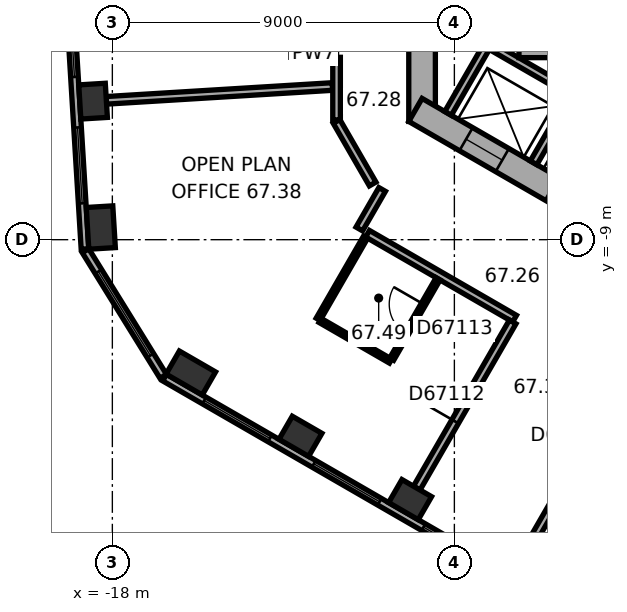
"""IFC4 building model, lengths in metres.
Left out: names, types, materials, properties, quantities, classifications, styles, units other than length and angle.
Written with IfcOpenShell. Run it as: python <this file> out.ifc"""

import sys

from ifc_helpers import new_model, si_unit, direction, frame, frame_2d, origin, origin_2d, place, context, subcontext, project, spatial, rectangle, extrude, element, fill, save


model = new_model("IFC4")
c1 = context("Model", 3, precision=1e-05, world=origin(), true_north=direction((0.0, 1.0)))
c2 = subcontext(c1, "Body", "Model", "MODEL_VIEW")
j1 = project(units=[si_unit("LENGTHUNIT", "METRE"), si_unit("PLANEANGLEUNIT", "RADIAN")], contexts=[c1])
p1 = place(None, origin())
s1 = spatial("IfcSite", under=j1, at=p1, CompositionType="ELEMENT")
p2 = place(p1, origin())
s2 = spatial("IfcBuilding", under=s1, at=p2, CompositionType="ELEMENT")
p3 = place(p2, frame((0.0, 0.0, 270.9)))
s3 = spatial("IfcBuildingStorey", under=s2, at=p3, CompositionType="ELEMENT", Elevation=270.9)
p4 = place(p3, frame((-18.508, -5.355, 0.0), z_axis=(0.0, 0.0, 1.0), x_axis=(0.061048539535, -0.998134798422, 0.0)))
e1 = element("IfcColumn", 1, at=p4, inside=s3, PredefinedType="COLUMN", context=c2, shape_type="SweptSolid", body=[
    extrude(rectangle(XDim=0.9, YDim=0.7, at=origin_2d()), origin(), (0.0, 0.0, 1.0), 3.7),
])
for number, where, z_axis, x_axis in (
    (2, (-18.304, -8.68, 0.0), (0.0, 0.0, 1.0), (0.061, -0.998, 0.0)),
    (3, (-15.936, -12.508, 0.0), (0.0, 0.0, 1.0), (0.866, -0.5, 0.0)),
):
    element("IfcColumn", number, at=place(p3, frame(where, z_axis=z_axis, x_axis=x_axis)), inside=s3, PredefinedType="COLUMN", context=c2, shape_type="SweptSolid", body=[
        extrude(rectangle(XDim=1.1, YDim=0.7, at=origin_2d()), origin(), (0.0, 0.0, 1.0), 3.7),
    ])
for number, where, z_axis, x_axis in (
    (4, (-13.05, -14.174, 0.0), (0.0, 0.0, 1.0), (0.866, -0.5, 0.0)),
    (5, (-10.165, -15.84, 0.0), (0.0, 0.0, 1.0), (0.866, -0.5, 0.0)),
):
    element("IfcColumn", number, at=place(p3, frame(where, z_axis=z_axis, x_axis=x_axis)), inside=s3, PredefinedType="COLUMN", context=c2, shape_type="SweptSolid", body=[
        extrude(rectangle(XDim=0.9, YDim=0.7, at=origin_2d()), origin(), (0.0, 0.0, 1.0), 3.7),
    ])
p5 = place(p3, frame((-9.85, 5.889, 0.0), z_axis=(0.0, 0.0, 1.0), x_axis=(0.0, -1.0, 0.0)))
e6 = element("IfcWall", 6, at=p5, inside=s3, PredefinedType="SHEAR", context=c2, shape_type="SweptSolid", body=[
    extrude(rectangle(XDim=11.778, YDim=0.7, at=frame_2d((5.889, 0.0))), origin(), (0.0, 0.0, 1.0), 3.7),
])
p6 = place(p5, frame((5.039, 0.0, 0.0)))
e7 = element("IfcOpeningElement", 7, at=p6, cuts=e6, PredefinedType="OPENING", context=c2, shape_type="SweptSolid", body=[
    extrude(rectangle(XDim=1.1, YDim=2.1, at=frame_2d((0.55, 1.05))), frame((0.0, 0.36, 0.0), z_axis=(0.0, -1.0, 0.0), x_axis=(1.0, 0.0, 0.0)), (0.0, 0.0, 1.0), 0.72),
])
p7 = place(p5, frame((7.639, 0.0, 0.0)))
e8 = element("IfcOpeningElement", 8, at=p7, cuts=e6, PredefinedType="OPENING", context=c2, shape_type="SweptSolid", body=[
    extrude(rectangle(XDim=1.1, YDim=2.1, at=frame_2d((0.55, 1.05))), frame((0.0, 0.36, 0.0), z_axis=(0.0, -1.0, 0.0), x_axis=(1.0, 0.0, 0.0)), (0.0, 0.0, 1.0), 0.72),
])
p8 = place(p3, frame((-10.025, -5.586, 0.0), z_axis=(0.0, 0.0, 1.0), x_axis=(0.866026453023, -0.499998182661, 0.0)))
e9 = element("IfcWall", 9, at=p8, inside=s3, PredefinedType="SHEAR", context=c2, shape_type="SweptSolid", body=[
    extrude(rectangle(XDim=11.778, YDim=0.7, at=frame_2d((5.889, 0.0))), origin(), (0.0, 0.0, 1.0), 3.7),
])
p9 = place(p8, frame((6.089, 0.0, 0.0)))
e10 = element("IfcOpeningElement", 10, at=p9, cuts=e9, PredefinedType="OPENING", context=c2, shape_type="SweptSolid", body=[
    extrude(rectangle(XDim=1.5, YDim=2.1, at=frame_2d((0.75, 1.05))), frame((0.0, 0.36, 0.0), z_axis=(0.0, -1.0, 0.0), x_axis=(1.0, 0.0, 0.0)), (0.0, 0.0, 1.0), 0.72),
])
p10 = place(p8, frame((1.539, 0.0, 0.0)))
e11 = element("IfcOpeningElement", 11, at=p10, cuts=e9, PredefinedType="OPENING", context=c2, shape_type="SweptSolid", body=[
    extrude(rectangle(XDim=1.1, YDim=2.1, at=frame_2d((0.55, 1.05))), frame((0.0, 0.36, 0.0), z_axis=(0.0, -1.0, 0.0), x_axis=(1.0, 0.0, 0.0)), (0.0, 0.0, 1.0), 0.72),
])
p11 = place(p8, frame((4.139, 0.0, 0.0)))
e12 = element("IfcOpeningElement", 12, at=p11, cuts=e9, PredefinedType="OPENING", context=c2, shape_type="SweptSolid", body=[
    extrude(rectangle(XDim=1.1, YDim=2.1, at=frame_2d((0.55, 1.05))), frame((0.0, 0.36, 0.0), z_axis=(0.0, -1.0, 0.0), x_axis=(1.0, 0.0, 0.0)), (0.0, 0.0, 1.0), 0.72),
])
p12 = place(p3, frame((-19.803, 8.454, 0.0), z_axis=(0.0, 0.0, 1.0), x_axis=(0.061036717565, -0.998135521414, 0.0)))
e13 = element("IfcWall", 13, at=p12, inside=s3, PredefinedType="STANDARD", context=c2, shape_type="SweptSolid", body=[
    extrude(rectangle(XDim=17.731, YDim=0.2, at=frame_2d((8.866, 0.0))), origin(), (0.0, 0.0, 1.0), 3.7),
])
p13 = place(p12, frame((1.202, 0.0, 0.9)))
e14 = element("IfcOpeningElement", 14, at=p13, cuts=e13, PredefinedType="OPENING", context=c2, shape_type="SweptSolid", body=[
    extrude(rectangle(XDim=2.0, YDim=2.0, at=frame_2d((1.0, 1.0))), frame((0.0, 0.11, 0.0), z_axis=(0.0, -1.0, 0.0), x_axis=(1.0, 0.0, 0.0)), (0.0, 0.0, 1.0), 0.22),
])
p14 = place(p12, frame((4.533, 0.0, 0.9)))
e15 = element("IfcOpeningElement", 15, at=p14, cuts=e13, PredefinedType="OPENING", context=c2, shape_type="SweptSolid", body=[
    extrude(rectangle(XDim=2.0, YDim=2.0, at=frame_2d((1.0, 1.0))), frame((0.0, 0.11, 0.0), z_axis=(0.0, -1.0, 0.0), x_axis=(1.0, 0.0, 0.0)), (0.0, 0.0, 1.0), 0.22),
])
p15 = place(p12, frame((7.865, 0.0, 0.9)))
e16 = element("IfcOpeningElement", 16, at=p15, cuts=e13, PredefinedType="OPENING", context=c2, shape_type="SweptSolid", body=[
    extrude(rectangle(XDim=2.0, YDim=2.0, at=frame_2d((1.0, 1.0))), frame((0.0, 0.11, 0.0), z_axis=(0.0, -1.0, 0.0), x_axis=(1.0, 0.0, 0.0)), (0.0, 0.0, 1.0), 0.22),
])
p16 = place(p12, frame((11.197, 0.0, 0.9)))
e17 = element("IfcOpeningElement", 17, at=p16, cuts=e13, PredefinedType="OPENING", context=c2, shape_type="SweptSolid", body=[
    extrude(rectangle(XDim=2.0, YDim=2.0, at=frame_2d((1.0, 1.0))), frame((0.0, 0.11, 0.0), z_axis=(0.0, -1.0, 0.0), x_axis=(1.0, 0.0, 0.0)), (0.0, 0.0, 1.0), 0.22),
])
p17 = place(p12, frame((14.528, 0.0, 0.9)))
e18 = element("IfcOpeningElement", 18, at=p17, cuts=e13, PredefinedType="OPENING", context=c2, shape_type="SweptSolid", body=[
    extrude(rectangle(XDim=2.0, YDim=2.0, at=frame_2d((1.0, 1.0))), frame((0.0, 0.11, 0.0), z_axis=(0.0, -1.0, 0.0), x_axis=(1.0, 0.0, 0.0)), (0.0, 0.0, 1.0), 0.22),
])
p18 = place(p3, frame((-18.706, -9.291, 0.0), z_axis=(0.0, 0.0, 1.0), x_axis=(0.526209683648, -0.850354848775, 0.0)))
e19 = element("IfcWall", 19, at=p18, inside=s3, PredefinedType="STANDARD", context=c2, shape_type="SweptSolid", body=[
    extrude(rectangle(XDim=3.886, YDim=0.2, at=frame_2d((1.943, 0.0))), origin(), (0.0, 0.0, 1.0), 3.7),
])
p19 = place(p18, frame((0.643, 0.0, 0.9)))
e20 = element("IfcOpeningElement", 20, at=p19, cuts=e19, PredefinedType="OPENING", context=c2, shape_type="SweptSolid", body=[
    extrude(rectangle(XDim=2.6, YDim=2.0, at=frame_2d((1.3, 1.0))), frame((0.0, 0.11, 0.0), z_axis=(0.0, -1.0, 0.0), x_axis=(1.0, 0.0, 0.0)), (0.0, 0.0, 1.0), 0.22),
])
p20 = place(p3, frame((-16.626, -12.629, 0.0), z_axis=(0.0, 0.0, 1.0), x_axis=(0.866026460444, -0.499998169808, 0.0)))
e21 = element("IfcWall", 21, at=p20, inside=s3, PredefinedType="STANDARD", context=c2, shape_type="SweptSolid", body=[
    extrude(rectangle(XDim=17.731, YDim=0.2, at=frame_2d((8.866, 0.0))), origin(), (0.0, 0.0, 1.0), 3.7),
])
p21 = place(p20, frame((1.203, 0.0, 0.9)))
e22 = element("IfcOpeningElement", 22, at=p21, cuts=e21, PredefinedType="OPENING", context=c2, shape_type="SweptSolid", body=[
    extrude(rectangle(XDim=2.0, YDim=2.0, at=frame_2d((1.0, 1.0))), frame((0.0, 0.11, 0.0), z_axis=(0.0, -1.0, 0.0), x_axis=(1.0, 0.0, 0.0)), (0.0, 0.0, 1.0), 0.22),
])
p22 = place(p20, frame((4.535, 0.0, 0.9)))
e23 = element("IfcOpeningElement", 23, at=p22, cuts=e21, PredefinedType="OPENING", context=c2, shape_type="SweptSolid", body=[
    extrude(rectangle(XDim=2.0, YDim=2.0, at=frame_2d((1.0, 1.0))), frame((0.0, 0.11, 0.0), z_axis=(0.0, -1.0, 0.0), x_axis=(1.0, 0.0, 0.0)), (0.0, 0.0, 1.0), 0.22),
])
p23 = place(p20, frame((7.867, 0.0, 0.9)))
e24 = element("IfcOpeningElement", 24, at=p23, cuts=e21, PredefinedType="OPENING", context=c2, shape_type="SweptSolid", body=[
    extrude(rectangle(XDim=2.0, YDim=2.0, at=frame_2d((1.0, 1.0))), frame((0.0, 0.11, 0.0), z_axis=(0.0, -1.0, 0.0), x_axis=(1.0, 0.0, 0.0)), (0.0, 0.0, 1.0), 0.22),
])
p24 = place(p20, frame((11.198, 0.0, 0.9)))
e25 = element("IfcOpeningElement", 25, at=p24, cuts=e21, PredefinedType="OPENING", context=c2, shape_type="SweptSolid", body=[
    extrude(rectangle(XDim=2.0, YDim=2.0, at=frame_2d((1.0, 1.0))), frame((0.0, 0.11, 0.0), z_axis=(0.0, -1.0, 0.0), x_axis=(1.0, 0.0, 0.0)), (0.0, 0.0, 1.0), 0.22),
])
p25 = place(p20, frame((14.53, 0.0, 0.9)))
e26 = element("IfcOpeningElement", 26, at=p25, cuts=e21, PredefinedType="OPENING", context=c2, shape_type="SweptSolid", body=[
    extrude(rectangle(XDim=2.0, YDim=2.0, at=frame_2d((1.0, 1.0))), frame((0.0, 0.11, 0.0), z_axis=(0.0, -1.0, 0.0), x_axis=(1.0, 0.0, 0.0)), (0.0, 0.0, 1.0), 0.22),
])
p26 = place(p3, frame((-8.203, -3.809, 0.0), z_axis=(0.0, 0.0, 1.0), x_axis=(0.866028230842, -0.499995103361, 0.0)))
e27 = element("IfcWall", 27, at=p26, inside=s3, PredefinedType="PARTITIONING", context=c2, shape_type="SweptSolid", body=[
    extrude(rectangle(XDim=5.4, YDim=0.2, at=frame_2d((2.7, 0.0))), origin(), (0.0, 0.0, 1.0), 3.42),
])
for number, where, z_axis, x_axis in (
    (28, (-8.067, -3.772, 0.0), (0.0, 0.0, 1.0), (-0.5, -0.866, 0.0)),
    (29, (-5.815, -5.072, 0.0), (0.0, 0.0, 1.0), (-0.5, -0.866, 0.0)),
):
    element("IfcWall", number, at=place(p3, frame(where, z_axis=z_axis, x_axis=x_axis)), inside=s3, PredefinedType="PARTITIONING", context=c2, shape_type="SweptSolid", body=[
        extrude(rectangle(XDim=2.2, YDim=0.2, at=frame_2d((1.1, 0.0))), origin(), (0.0, 0.0, 1.0), 3.42),
    ])
p27 = place(p3, frame((-2.6, -4.06, 0.0), z_axis=(0.0, 0.0, 1.0), x_axis=(-1.0, 0.0, 0.0)))
e30 = element("IfcWall", 30, at=p27, inside=s3, PredefinedType="SHEAR", context=c2, shape_type="SweptSolid", body=[
    extrude(rectangle(XDim=4.7, YDim=0.3, at=frame_2d((2.35, 0.0))), origin(), (0.0, 0.0, 1.0), 3.42),
])
p28 = place(p3, frame((-18.158, -5.333, 0.0), z_axis=(0.0, 0.0, 1.0), x_axis=(0.998135365626, 0.061039265125, 0.0)))
e31 = element("IfcWall", 31, at=p28, inside=s3, PredefinedType="PARTITIONING", context=c2, shape_type="SweptSolid", body=[
    extrude(rectangle(XDim=5.96, YDim=0.2, at=frame_2d((2.98, 0.0))), origin(), (0.0, 0.0, 1.0), 2.87),
])
p29 = place(p3, frame((-13.301, -4.101, 0.0), z_axis=(0.0, 0.0, 1.0), x_axis=(1.0, 0.0, 0.0)))
e32 = element("IfcWall", 32, at=p29, inside=s3, PredefinedType="PARTITIONING", context=c2, shape_type="SweptSolid", body=[
    extrude(rectangle(XDim=1.201, YDim=0.2, at=frame_2d((0.601, 0.0))), origin(), (0.0, 0.0, 1.0), 3.42),
])
p30 = place(p3, frame((-12.585, -11.095, 0.0), z_axis=(0.0, 0.0, 1.0), x_axis=(0.500004234368, 0.866022959057, 0.0)))
e33 = element("IfcWall", 33, at=p30, inside=s3, PredefinedType="PARTITIONING", context=c2, shape_type="SweptSolid", body=[
    extrude(rectangle(XDim=2.5, YDim=0.12, at=frame_2d((1.25, 0.0))), origin(), (0.0, 0.0, 1.0), 3.42),
])
p31 = place(p3, frame((-12.1, -5.889, 0.0), z_axis=(0.0, 0.0, 1.0), x_axis=(0.500063520245, -0.865988727248, 0.0)))
e34 = element("IfcWall", 34, at=p31, inside=s3, PredefinedType="PARTITIONING", context=c2, shape_type="SweptSolid", body=[
    extrude(rectangle(XDim=1.9, YDim=0.2, at=frame_2d((0.95, 0.0))), origin(), (0.0, 0.0, 1.0), 3.42),
])
p32 = place(p3, frame((-12.1, -4.201, 0.0), z_axis=(0.0, 0.0, 1.0), x_axis=(0.0, -1.0, 0.0)))
e35 = element("IfcWall", 35, at=p32, inside=s3, PredefinedType="PARTITIONING", context=c2, shape_type="SweptSolid", body=[
    extrude(rectangle(XDim=1.648, YDim=0.2, at=frame_2d((0.824, 0.0))), origin(), (0.0, 0.0, 1.0), 3.42),
])
p33 = place(p3, frame((-11.285, -8.844, 0.0), z_axis=(0.0, 0.0, 1.0), x_axis=(0.866021785011, -0.500006267848, 0.0)))
e36 = element("IfcWall", 36, at=p33, inside=s3, PredefinedType="PARTITIONING", context=c2, shape_type="SweptSolid", body=[
    extrude(rectangle(XDim=4.468, YDim=0.2, at=frame_2d((2.234, 0.0))), origin(), (0.0, 0.0, 1.0), 3.42),
])
p34 = place(p3, frame((-10.901, -7.678, 0.0), z_axis=(0.0, 0.0, 1.0), x_axis=(-0.500074377092, -0.865982457891, 0.0)))
e37 = element("IfcWall", 37, at=p34, inside=s3, PredefinedType="PARTITIONING", context=c2, shape_type="SweptSolid", body=[
    extrude(rectangle(XDim=1.201, YDim=0.2, at=frame_2d((0.601, 0.0))), origin(), (0.0, 0.0, 1.0), 3.42),
])
p35 = place(p3, frame((-10.679, -12.195, 0.0), z_axis=(0.0, 0.0, 1.0), x_axis=(-0.866037418504, 0.499979189318, 0.0)))
e38 = element("IfcWall", 38, at=p35, inside=s3, PredefinedType="PARTITIONING", context=c2, shape_type="SweptSolid", body=[
    extrude(rectangle(XDim=2.14, YDim=0.12, at=frame_2d((1.07, 0.0))), origin(), (0.0, 0.0, 1.0), 3.42),
])
p36 = place(p3, frame((-9.99, -15.537, 0.0), z_axis=(0.0, 0.0, 1.0), x_axis=(0.499966611936, 0.866044679534, 0.0)))
e39 = element("IfcWall", 39, at=p36, inside=s3, PredefinedType="PARTITIONING", context=c2, shape_type="SweptSolid", body=[
    extrude(rectangle(XDim=5.049, YDim=0.2, at=frame_2d((2.524, 0.0))), origin(), (0.0, 0.0, 1.0), 2.87),
])
p37 = place(p36, frame((2.024, 0.0, 0.0)))
e40 = element("IfcOpeningElement", 40, at=p37, cuts=e39, PredefinedType="OPENING", context=c2, shape_type="SweptSolid", body=[
    extrude(rectangle(XDim=1.0, YDim=2.1, at=frame_2d((0.5, 1.05))), frame((0.0, 0.11, 0.0), z_axis=(0.0, -1.0, 0.0), x_axis=(1.0, 0.0, 0.0)), (0.0, 0.0, 1.0), 0.22),
])
p38 = place(p3, frame((-9.429, -10.03, 0.0), z_axis=(0.0, 0.0, 1.0), x_axis=(-0.500034220881, -0.866005645448, 0.0)))
e41 = element("IfcWall", 41, at=p38, inside=s3, PredefinedType="PARTITIONING", context=c2, shape_type="SweptSolid", body=[
    extrude(rectangle(XDim=2.44, YDim=0.12, at=frame_2d((1.22, 0.0))), origin(), (0.0, 0.0, 1.0), 3.42),
])
p39 = place(p38, frame((0.77, 0.0, 0.0)))
e42 = element("IfcOpeningElement", 42, at=p39, cuts=e41, PredefinedType="OPENING", context=c2, shape_type="SweptSolid", body=[
    extrude(rectangle(XDim=0.9, YDim=2.1, at=frame_2d((0.45, 1.05))), frame((0.0, 0.07, 0.0), z_axis=(0.0, -1.0, 0.0), x_axis=(1.0, 0.0, 0.0)), (0.0, 0.0, 1.0), 0.14),
])
p40 = place(p3, frame((-7.105, -17.202, 0.0), z_axis=(0.0, 0.0, 1.0), x_axis=(0.499988692146, 0.866031932279, 0.0)))
e43 = element("IfcWall", 43, at=p40, inside=s3, PredefinedType="PARTITIONING", context=c2, shape_type="SweptSolid", body=[
    extrude(rectangle(XDim=6.35, YDim=0.2, at=frame_2d((3.175, 0.0))), origin(), (0.0, 0.0, 1.0), 3.42),
])
p41 = place(p40, frame((2.675, 0.0, 0.0)))
e44 = element("IfcOpeningElement", 44, at=p41, cuts=e43, PredefinedType="OPENING", context=c2, shape_type="SweptSolid", body=[
    extrude(rectangle(XDim=1.0, YDim=2.1, at=frame_2d((0.5, 1.05))), frame((0.0, 0.11, 0.0), z_axis=(0.0, -1.0, 0.0), x_axis=(1.0, 0.0, 0.0)), (0.0, 0.0, 1.0), 0.22),
])
p42 = place(p16, origin())
e45 = element("IfcWindow", 45, at=p42, inside=s3, PartitioningType="SINGLE_PANEL", PredefinedType="WINDOW", context=c2, shape_type="SweptSolid", body=[
    extrude(rectangle(XDim=2.0, YDim=2.0, at=frame_2d((1.0, 1.0))), frame((0.0, 0.03, 0.0), z_axis=(0.0, -1.0, 0.0), x_axis=(1.0, 0.0, 0.0)), (0.0, 0.0, 1.0), 0.06),
])
fill(e17, e45)
p43 = place(p17, origin())
e46 = element("IfcWindow", 46, at=p43, inside=s3, PartitioningType="SINGLE_PANEL", PredefinedType="WINDOW", context=c2, shape_type="SweptSolid", body=[
    extrude(rectangle(XDim=2.0, YDim=2.0, at=frame_2d((1.0, 1.0))), frame((0.0, 0.03, 0.0), z_axis=(0.0, -1.0, 0.0), x_axis=(1.0, 0.0, 0.0)), (0.0, 0.0, 1.0), 0.06),
])
fill(e18, e46)
p44 = place(p19, origin())
e47 = element("IfcWindow", 47, at=p44, inside=s3, PartitioningType="SINGLE_PANEL", PredefinedType="WINDOW", context=c2, shape_type="SweptSolid", body=[
    extrude(rectangle(XDim=2.6, YDim=2.0, at=frame_2d((1.3, 1.0))), frame((0.0, 0.03, 0.0), z_axis=(0.0, -1.0, 0.0), x_axis=(1.0, 0.0, 0.0)), (0.0, 0.0, 1.0), 0.06),
])
fill(e20, e47)
p45 = place(p21, origin())
e48 = element("IfcWindow", 48, at=p45, inside=s3, PartitioningType="SINGLE_PANEL", PredefinedType="WINDOW", context=c2, shape_type="SweptSolid", body=[
    extrude(rectangle(XDim=2.0, YDim=2.0, at=frame_2d((1.0, 1.0))), frame((0.0, 0.03, 0.0), z_axis=(0.0, -1.0, 0.0), x_axis=(1.0, 0.0, 0.0)), (0.0, 0.0, 1.0), 0.06),
])
fill(e22, e48)
p46 = place(p22, origin())
e49 = element("IfcWindow", 49, at=p46, inside=s3, PartitioningType="SINGLE_PANEL", PredefinedType="WINDOW", context=c2, shape_type="SweptSolid", body=[
    extrude(rectangle(XDim=2.0, YDim=2.0, at=frame_2d((1.0, 1.0))), frame((0.0, 0.03, 0.0), z_axis=(0.0, -1.0, 0.0), x_axis=(1.0, 0.0, 0.0)), (0.0, 0.0, 1.0), 0.06),
])
fill(e23, e49)
p47 = place(p23, origin())
e50 = element("IfcWindow", 50, at=p47, inside=s3, PartitioningType="SINGLE_PANEL", PredefinedType="WINDOW", context=c2, shape_type="SweptSolid", body=[
    extrude(rectangle(XDim=2.0, YDim=2.0, at=frame_2d((1.0, 1.0))), frame((0.0, 0.03, 0.0), z_axis=(0.0, -1.0, 0.0), x_axis=(1.0, 0.0, 0.0)), (0.0, 0.0, 1.0), 0.06),
])
fill(e24, e50)
p48 = place(p10, origin())
e51 = element("IfcDoor", 51, at=p48, inside=s3, OperationType="DOUBLE_DOOR_SLIDING", PredefinedType="DOOR", context=c2, shape_type="SweptSolid", body=[
    extrude(rectangle(XDim=1.1, YDim=2.1, at=frame_2d((0.55, 1.05))), frame((0.0, 0.025, 0.0), z_axis=(0.0, -1.0, 0.0), x_axis=(1.0, 0.0, 0.0)), (0.0, 0.0, 1.0), 0.05),
])
fill(e11, e51)
p49 = place(p37, origin())
e52 = element("IfcDoor", 52, at=p49, inside=s3, OperationType="SINGLE_SWING_LEFT", PredefinedType="DOOR", context=c2, shape_type="SweptSolid", body=[
    extrude(rectangle(XDim=1.0, YDim=2.1, at=frame_2d((0.5, 1.05))), frame((0.0, 0.025, 0.0), z_axis=(0.0, -1.0, 0.0), x_axis=(1.0, 0.0, 0.0)), (0.0, 0.0, 1.0), 0.05),
])
fill(e40, e52)
p50 = place(p39, origin())
e53 = element("IfcDoor", 53, at=p50, inside=s3, OperationType="SINGLE_SWING_LEFT", PredefinedType="DOOR", context=c2, shape_type="SweptSolid", body=[
    extrude(rectangle(XDim=0.9, YDim=2.1, at=frame_2d((0.45, 1.05))), frame((0.0, 0.025, 0.0), z_axis=(0.0, -1.0, 0.0), x_axis=(1.0, 0.0, 0.0)), (0.0, 0.0, 1.0), 0.05),
])
fill(e42, e53)
save(model, sys.argv[1])
